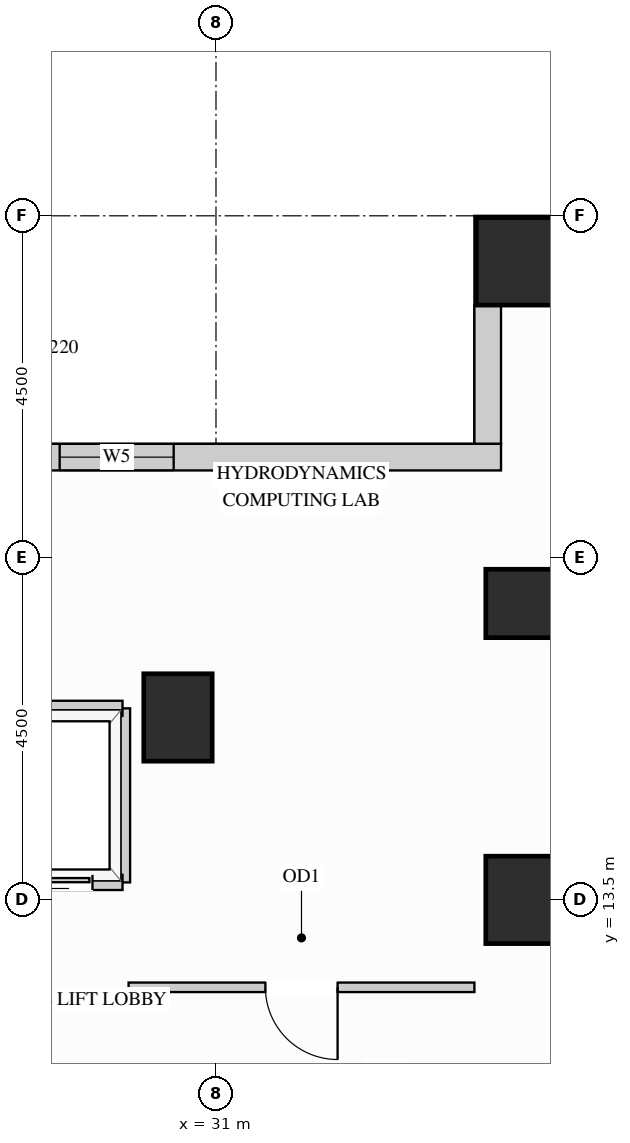
"""IFC4 building model, lengths in metres.
Left out: names, types, materials, properties, quantities, classifications, styles, units other than length and angle.
Written with IfcOpenShell. Run it as: python <this file> out.ifc"""

import sys

from ifc_helpers import new_model, si_unit, direction, frame, frame_2d, origin, origin_2d, place, context, subcontext, project, spatial, rectangle, extrude, source, transform, mapped, element, fill, save


model = new_model("IFC4")
c1 = context("Model", 3, precision=1e-05, world=origin(), true_north=direction((0.0, 1.0)))
c2 = subcontext(c1, "Body", "Model", "MODEL_VIEW")
j1 = project(units=[si_unit("LENGTHUNIT", "METRE"), si_unit("PLANEANGLEUNIT", "RADIAN")], contexts=[c1])
p1 = place(None, origin())
s1 = spatial("IfcSite", under=j1, at=p1, CompositionType="ELEMENT")
p2 = place(p1, origin())
s2 = spatial("IfcBuilding", under=s1, at=p2, CompositionType="ELEMENT")
p3 = place(p2, frame((0.0, 0.0, 120.6)))
s3 = spatial("IfcBuildingStorey", under=s2, at=p3, CompositionType="ELEMENT", Elevation=120.6)
m1 = source(origin(), c2, "Body", "SweptSolid", [
    extrude(rectangle(XDim=0.9, YDim=0.9, at=origin_2d()), origin(), (0.0, 0.0, 1.0), 3.38),
])
p4 = place(p3, frame((35.0, 17.4, 0.0), z_axis=(0.0, 0.0, 1.0), x_axis=(1.0, 0.0, 0.0)))
e1 = element("IfcColumn", 1, at=p4, inside=s3, PredefinedType="COLUMN", context=c2, shape_type="MappedRepresentation", body=[
    mapped(m1, transform((0.0, 0.0, 0.0), x_axis=(1.0, 0.0, 0.0), y_axis=(0.0, 1.0, 0.0), z_axis=(0.0, 0.0, 1.0))),
])
m2 = source(origin(), c2, "Body", "SweptSolid", [
    extrude(rectangle(XDim=0.9, YDim=1.15, at=origin_2d()), origin(), (0.0, 0.0, 1.0), 3.38),
])
for number, where, z_axis, x_axis in (
    (2, (35.0, 13.5, 0.0), (0.0, 0.0, 1.0), (1.0, 0.0, 0.0)),
    (3, (30.5, 15.9, 0.0), (0.0, 0.0, 1.0), (1.0, 0.0, 0.0)),
):
    element("IfcColumn", number, at=place(p3, frame(where, z_axis=z_axis, x_axis=x_axis)), inside=s3, PredefinedType="COLUMN", context=c2, shape_type="MappedRepresentation", body=[
        mapped(m2, transform((0.0, 0.0, 0.0), x_axis=(1.0, 0.0, 0.0), y_axis=(0.0, 1.0, 0.0), z_axis=(0.0, 0.0, 1.0))),
    ])
m3 = source(origin(), c2, "Body", "SweptSolid", [
    extrude(rectangle(XDim=1.15, YDim=1.15, at=origin_2d()), origin(), (0.0, 0.0, 1.0), 3.38),
])
p5 = place(p3, frame((35.0, 21.9, 0.0), z_axis=(0.0, 0.0, 1.0), x_axis=(1.0, 0.0, 0.0)))
e4 = element("IfcColumn", 4, at=p5, inside=s3, PredefinedType="COLUMN", context=c2, shape_type="MappedRepresentation", body=[
    mapped(m3, transform((0.0, 0.0, 0.0), x_axis=(1.0, 0.0, 0.0), y_axis=(0.0, 1.0, 0.0), z_axis=(0.0, 0.0, 1.0))),
])
m4 = source(origin(), c2, "Body", "SweptSolid", [
    extrude(rectangle(XDim=1.829, YDim=0.35, at=frame_2d((0.915, 0.0))), origin(), (0.0, 0.0, 1.0), 3.365),
])
p6 = place(p3, frame((34.575, 21.327, 0.0), z_axis=(0.0, 0.0, 1.0), x_axis=(0.0, -1.0, 0.0)))
e5 = element("IfcWall", 5, at=p6, inside=s3, PredefinedType="SOLIDWALL", context=c2, shape_type="MappedRepresentation", body=[
    mapped(m4, transform((0.0, 0.0, 0.0), x_axis=(1.0, 0.0, 0.0), y_axis=(0.0, 1.0, 0.0), z_axis=(0.0, 0.0, 1.0))),
])
p7 = place(p3, frame((34.75, 19.325, 0.0), z_axis=(0.0, 0.0, 1.0), x_axis=(-1.0, 0.0, 0.0)))
e6 = element("IfcWall", 6, at=p7, inside=s3, PredefinedType="SOLIDWALL", context=c2, shape_type="SweptSolid", body=[
    extrude(rectangle(XDim=15.6, YDim=0.35, at=frame_2d((7.8, 0.0))), origin(), (0.0, 0.0, 1.0), 3.365),
])
p8 = place(p7, frame((4.307, 0.0, 0.78)))
e7 = element("IfcOpeningElement", 7, at=p8, cuts=e6, PredefinedType="OPENING", context=c2, shape_type="SweptSolid", body=[
    extrude(rectangle(XDim=1.5, YDim=2.0, at=frame_2d((0.75, 1.0))), frame((0.0, 0.185, 0.0), z_axis=(0.0, -1.0, 0.0), x_axis=(1.0, 0.0, 0.0)), (0.0, 0.0, 1.0), 0.37),
])
p9 = place(p7, frame((9.793, 0.0, 0.78)))
e8 = element("IfcOpeningElement", 8, at=p9, cuts=e6, PredefinedType="OPENING", context=c2, shape_type="SweptSolid", body=[
    extrude(rectangle(XDim=1.5, YDim=2.0, at=frame_2d((0.75, 1.0))), frame((0.0, 0.185, 0.0), z_axis=(0.0, -1.0, 0.0), x_axis=(1.0, 0.0, 0.0)), (0.0, 0.0, 1.0), 0.37),
])
p10 = place(p3, frame((29.85, 12.35, 0.0), z_axis=(0.0, 0.0, 1.0), x_axis=(1.0, 0.0, 0.0)))
e9 = element("IfcWall", 9, at=p10, inside=s3, PredefinedType="PARTITIONING", context=c2, shape_type="SweptSolid", body=[
    extrude(rectangle(XDim=4.55, YDim=0.125, at=frame_2d((2.275, 0.0))), origin(), (0.0, 0.0, 1.0), 3.365),
])
p11 = place(p10, frame((1.8, 0.0, 0.0)))
e10 = element("IfcOpeningElement", 10, at=p11, cuts=e9, PredefinedType="OPENING", context=c2, shape_type="SweptSolid", body=[
    extrude(rectangle(XDim=0.95, YDim=2.15, at=frame_2d((0.475, 1.075))), frame((0.0, 0.073, 0.0), z_axis=(0.0, -1.0, 0.0), x_axis=(1.0, 0.0, 0.0)), (0.0, 0.0, 1.0), 0.145),
])
m5 = source(origin(), c2, "Body", "SweptSolid", [
    extrude(rectangle(XDim=2.29, YDim=0.2, at=frame_2d((1.145, 0.0))), origin(), (0.0, 0.0, 1.0), 3.365),
])
p12 = place(p3, frame((29.77, 13.73, 0.0), z_axis=(0.0, 0.0, 1.0), x_axis=(0.0, 1.0, 0.0)))
e11 = element("IfcWall", 11, at=p12, inside=s3, PredefinedType="PARTITIONING", context=c2, shape_type="MappedRepresentation", body=[
    mapped(m5, transform((0.0, 0.0, 0.0), x_axis=(1.0, 0.0, 0.0), y_axis=(0.0, 1.0, 0.0), z_axis=(0.0, 0.0, 1.0))),
])
m6 = source(origin(), c2, "Body", "SweptSolid", [
    extrude(rectangle(XDim=1.89, YDim=0.2, at=frame_2d((0.945, 0.0))), origin(), (0.0, 0.0, 1.0), 2.677),
])
p13 = place(p3, frame((27.88, 16.02, 0.0), z_axis=(0.0, 0.0, 1.0), x_axis=(1.0, 0.0, 0.0)))
e12 = element("IfcWall", 12, at=p13, inside=s3, PredefinedType="PARTITIONING", context=c2, shape_type="MappedRepresentation", body=[
    mapped(m6, transform((0.0, 0.0, 0.0), x_axis=(1.0, 0.0, 0.0), y_axis=(0.0, 1.0, 0.0), z_axis=(0.0, 0.0, 1.0))),
])
p14 = place(p3, frame((27.88, 13.73, 0.0), z_axis=(0.0, 0.0, 1.0), x_axis=(1.0, 0.0, 0.0)))
e13 = element("IfcWall", 13, at=p14, inside=s3, PredefinedType="PARTITIONING", context=c2, shape_type="SweptSolid", body=[
    extrude(rectangle(XDim=1.89, YDim=0.2, at=frame_2d((0.945, 0.0))), origin(), (0.0, 0.0, 1.0), 2.446),
])
p15 = place(p14, frame((0.395, 0.0, 0.0)))
e14 = element("IfcOpeningElement", 14, at=p15, cuts=e13, PredefinedType="OPENING", context=c2, shape_type="SweptSolid", body=[
    extrude(rectangle(XDim=1.1, YDim=2.2, at=frame_2d((0.55, 1.1))), frame((0.0, 0.11, 0.0), z_axis=(0.0, -1.0, 0.0), x_axis=(1.0, 0.0, 0.0)), (0.0, 0.0, 1.0), 0.22),
])
m7 = source(origin(), c2, "Body", "SweptSolid", [
    extrude(rectangle(XDim=1.1, YDim=2.2, at=frame_2d((0.55, 1.1))), frame((0.0, 0.025, 0.0), z_axis=(0.0, -1.0, 0.0), x_axis=(1.0, 0.0, 0.0)), (0.0, 0.0, 1.0), 0.05),
])
p16 = place(p15, origin())
e15 = element("IfcDoor", 15, at=p16, inside=s3, OperationType="SLIDING_TO_LEFT", PredefinedType="DOOR", context=c2, shape_type="MappedRepresentation", body=[
    mapped(m7, transform((0.0, 0.0, 0.0), x_axis=(1.0, 0.0, 0.0), y_axis=(0.0, 1.0, 0.0), z_axis=(0.0, 0.0, 1.0))),
])
fill(e14, e15)
m8 = source(origin(), c2, "Body", "SweptSolid", [
    extrude(rectangle(XDim=0.95, YDim=2.15, at=frame_2d((0.475, 1.075))), frame((0.0, 0.025, 0.0), z_axis=(0.0, -1.0, 0.0), x_axis=(1.0, 0.0, 0.0)), (0.0, 0.0, 1.0), 0.05),
])
p17 = place(p11, origin())
e16 = element("IfcDoor", 16, at=p17, inside=s3, OperationType="SINGLE_SWING_RIGHT", PredefinedType="DOOR", context=c2, shape_type="MappedRepresentation", body=[
    mapped(m8, transform((0.0, 0.0, 0.0), x_axis=(1.0, 0.0, 0.0), y_axis=(0.0, 1.0, 0.0), z_axis=(0.0, 0.0, 1.0))),
])
fill(e10, e16)
m9 = source(origin(), c2, "Body", "SweptSolid", [
    extrude(rectangle(XDim=1.5, YDim=2.0, at=frame_2d((0.75, 1.0))), frame((0.0, 0.03, 0.0), z_axis=(0.0, -1.0, 0.0), x_axis=(1.0, 0.0, 0.0)), (0.0, 0.0, 1.0), 0.06),
])
p18 = place(p8, origin())
e17 = element("IfcWindow", 17, at=p18, inside=s3, PartitioningType="SINGLE_PANEL", PredefinedType="WINDOW", context=c2, shape_type="MappedRepresentation", body=[
    mapped(m9, transform((0.0, 0.0, 0.0), x_axis=(1.0, 0.0, 0.0), y_axis=(0.0, 1.0, 0.0), z_axis=(0.0, 0.0, 1.0))),
])
fill(e7, e17)
save(model, sys.argv[1])
